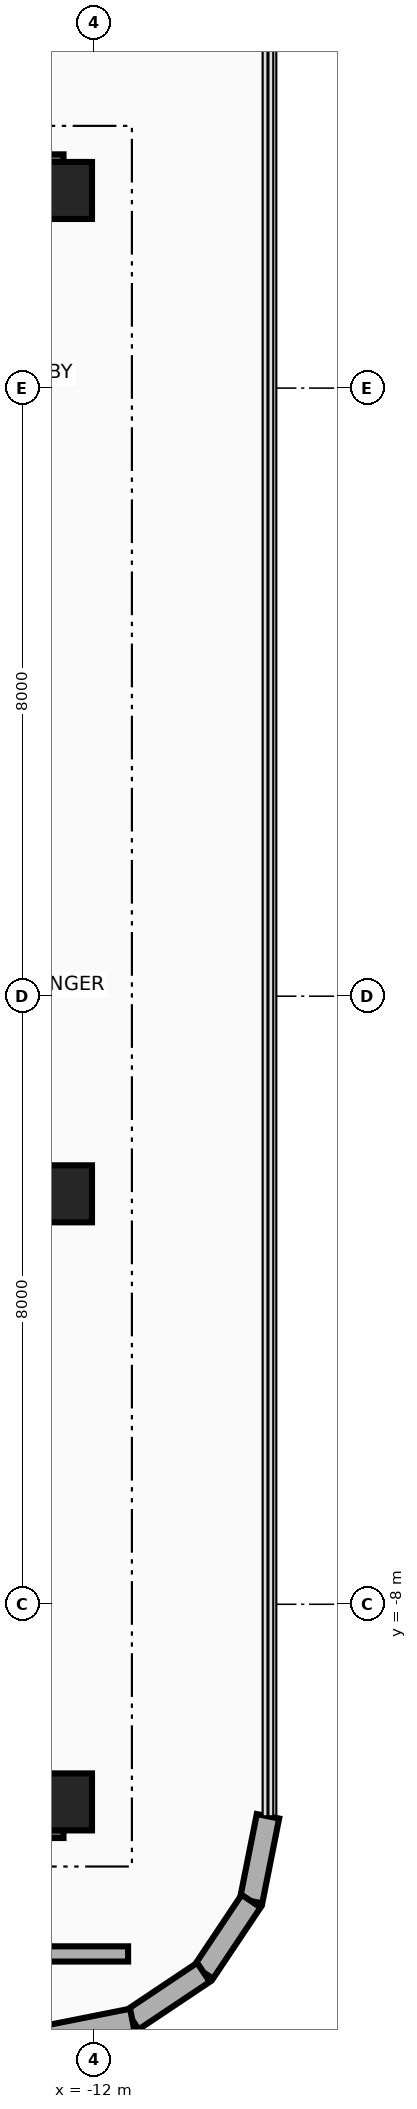
"""IFC4 building model, lengths in metres.
Left out: names, types, materials, properties, quantities, classifications, styles, units other than length and angle.
Written with IfcOpenShell. Run it as: python <this file> out.ifc"""

import sys

from ifc_helpers import new_model, si_unit, direction, frame, frame_2d, origin, origin_2d, place, context, subcontext, project, spatial, rectangle, extrude, source, transform, mapped, element, save


model = new_model("IFC4")
c1 = context("Model", 3, precision=1e-05, world=origin(), true_north=direction((0.0, 1.0)))
c2 = subcontext(c1, "Body", "Model", "MODEL_VIEW")
j1 = project(units=[si_unit("LENGTHUNIT", "METRE"), si_unit("PLANEANGLEUNIT", "RADIAN")], contexts=[c1])
p1 = place(None, origin())
s1 = spatial("IfcSite", under=j1, at=p1, CompositionType="ELEMENT")
p2 = place(p1, origin())
s2 = spatial("IfcBuilding", under=s1, at=p2, CompositionType="ELEMENT")
p3 = place(p2, frame((0.0, 0.0, 294.2)))
s3 = spatial("IfcBuildingStorey", under=s2, at=p3, CompositionType="ELEMENT", Elevation=294.2)
for number, where, z_axis, x_axis in (
    (1, (-22.65, 10.8, 0.0), (0.0, 0.0, 1.0), (1.0, 0.0, 0.0)),
    (2, (-22.65, -10.8, 0.0), (0.0, 0.0, 1.0), (1.0, 0.0, 0.0)),
):
    element("IfcWall", number, at=place(p3, frame(where, z_axis=z_axis, x_axis=x_axis)), inside=s3, PredefinedType="SHEAR", context=c2, shape_type="SweptSolid", body=[
        extrude(rectangle(XDim=10.25, YDim=0.55, at=frame_2d((5.125, 0.0))), origin(), (0.0, 0.0, 1.0), 4.96),
    ])
m1 = source(origin(), c2, "Body", "SweptSolid", [
    extrude(rectangle(XDim=0.75, YDim=0.75, at=origin_2d()), origin(), (0.0, 0.0, 1.0), 5.2),
])
for number, where, z_axis, x_axis in (
    (3, (-12.4, -10.6, 0.0), (0.0, 0.0, 1.0), (1.0, 0.0, 0.0)),
    (4, (-12.4, -2.6, 0.0), (0.0, 0.0, 1.0), (1.0, 0.0, 0.0)),
    (5, (-12.4, 10.6, 0.0), (0.0, 0.0, 1.0), (1.0, 0.0, 0.0)),
):
    element("IfcColumn", number, at=place(p3, frame(where, z_axis=z_axis, x_axis=x_axis)), inside=s3, PredefinedType="COLUMN", context=c2, shape_type="MappedRepresentation", body=[
        mapped(m1, transform((0.0, 0.0, 0.0), x_axis=(1.0, 0.0, 0.0), y_axis=(0.0, 1.0, 0.0), z_axis=(0.0, 0.0, 1.0), scale=1.0)),
    ])
p4 = place(p3, frame((-9.71, -10.789, 0.0), z_axis=(0.0, 0.0, 1.0), x_axis=(-0.195043173023, -0.980794657743, 0.0)))
e6 = element("IfcWall", 6, at=p4, inside=s3, PredefinedType="SOLIDWALL", context=c2, shape_type="SweptSolid", body=[
    extrude(rectangle(XDim=1.138, YDim=0.3, at=frame_2d((0.569, 0.0))), origin(), (0.0, 0.0, 1.0), 4.96),
])
for number, where, z_axis, x_axis in (
    (7, (-9.932, -11.905, 0.0), (0.0, 0.0, 1.0), (-0.556, -0.831, 0.0)),
    (8, (-10.558, -12.842, 0.0), (0.0, 0.0, 1.0), (-0.831, -0.556, 0.0)),
):
    element("IfcWall", number, at=place(p3, frame(where, z_axis=z_axis, x_axis=x_axis)), inside=s3, PredefinedType="SOLIDWALL", context=c2, shape_type="SweptSolid", body=[
        extrude(rectangle(XDim=1.127, YDim=0.3, at=frame_2d((0.563, 0.0))), origin(), (0.0, 0.0, 1.0), 4.96),
    ])
p5 = place(p3, frame((-11.495, -13.468, 0.0), z_axis=(0.0, 0.0, 1.0), x_axis=(-0.980794657743, -0.195043173023, 0.0)))
e9 = element("IfcWall", 9, at=p5, inside=s3, PredefinedType="SOLIDWALL", context=c2, shape_type="SweptSolid", body=[
    extrude(rectangle(XDim=1.138, YDim=0.3, at=frame_2d((0.569, 0.0))), origin(), (0.0, 0.0, 1.0), 4.96),
])
p6 = place(p3, frame((-23.45, -12.6, 0.0), z_axis=(0.0, 0.0, 1.0), x_axis=(1.0, 0.0, 0.0)))
e10 = element("IfcWall", 10, at=p6, inside=s3, PredefinedType="PARTITIONING", context=c2, shape_type="SweptSolid", body=[
    extrude(rectangle(XDim=11.9, YDim=0.2, at=frame_2d((5.95, 0.0))), origin(), (0.0, 0.0, 1.0), 4.96),
])
save(model, sys.argv[1])
